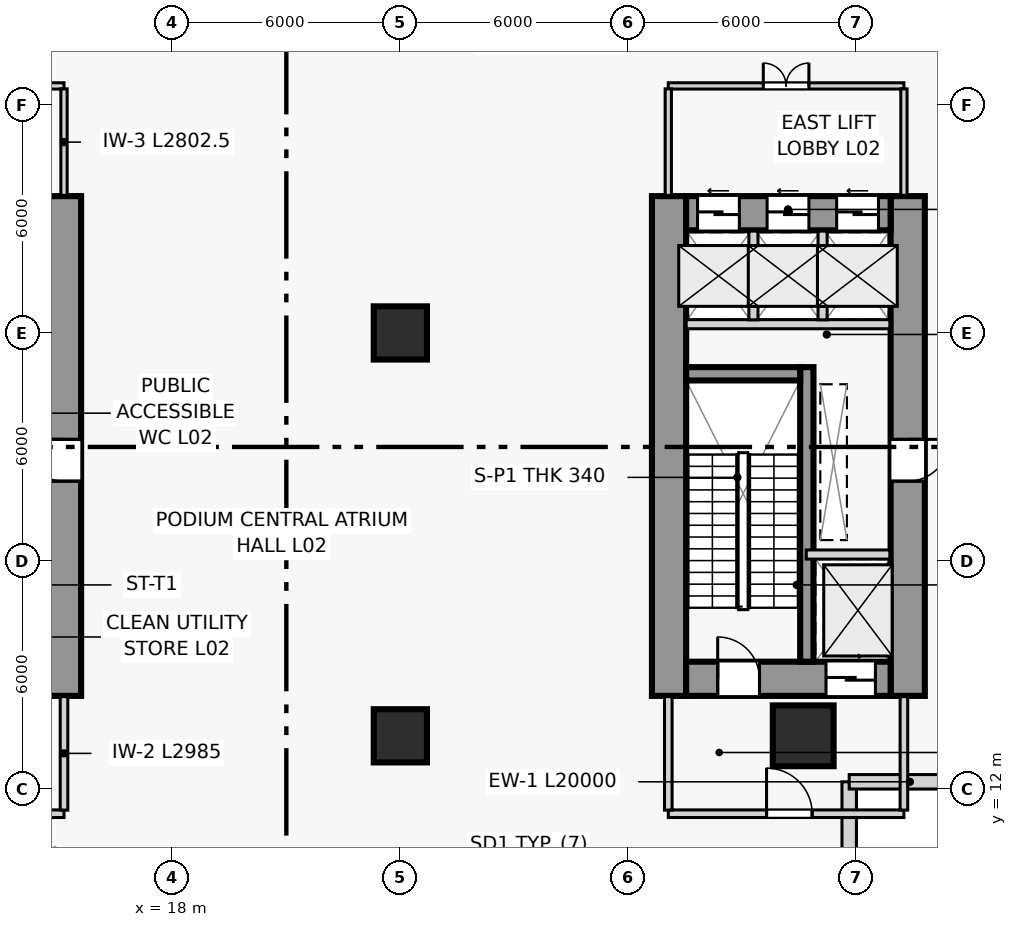
"""IFC4 building model, lengths in metres.
Left out: names, types, materials, properties, quantities, classifications, styles, units other than length and angle.
Written with IfcOpenShell. Run it as: python <this file> out.ifc"""

import sys

from ifc_helpers import new_model, si_unit, direction, frame, frame_2d, origin, origin_2d, place, context, subcontext, project, spatial, rectangle, extrude, source, transform, mapped, element, fill, save


model = new_model("IFC4")
c1 = context("Model", 3, precision=1e-05, world=origin(), true_north=direction((0.0, 1.0)))
c2 = subcontext(c1, "Body", "Model", "MODEL_VIEW")
j1 = project(units=[si_unit("LENGTHUNIT", "METRE"), si_unit("PLANEANGLEUNIT", "RADIAN")], contexts=[c1])
p1 = place(None, origin())
s1 = spatial("IfcSite", under=j1, at=p1, CompositionType="ELEMENT")
p2 = place(p1, origin())
s2 = spatial("IfcBuilding", under=s1, at=p2, CompositionType="ELEMENT")
p3 = place(p2, frame((0.0, 0.0, 9.0)))
s3 = spatial("IfcBuildingStorey", under=s2, at=p3, CompositionType="ELEMENT", Elevation=9.0)
p4 = place(p3, frame((15.15, 14.45, 0.0), z_axis=(0.0, 0.0, 1.0), x_axis=(0.0, 1.0, 0.0)))
e1 = element("IfcWall", 1, at=p4, inside=s3, PredefinedType="SHEAR", context=c2, shape_type="SweptSolid", body=[
    extrude(rectangle(XDim=13.15, YDim=0.9, at=frame_2d((6.575, 0.0))), origin(), (0.0, 0.0, 1.0), 4.5),
])
p5 = place(p4, frame((5.65, 0.0, 0.0)))
e2 = element("IfcOpeningElement", 2, at=p5, cuts=e1, PredefinedType="OPENING", context=c2, shape_type="SweptSolid", body=[
    extrude(rectangle(XDim=1.1, YDim=2.2, at=frame_2d((0.55, 1.1))), frame((0.0, 0.46, 0.0), z_axis=(0.0, -1.0, 0.0), x_axis=(1.0, 0.0, 0.0)), (0.0, 0.0, 1.0), 0.92),
])
p6 = place(p3, frame((31.07, 14.45, 0.0), z_axis=(0.0, 0.0, 1.0), x_axis=(0.0, 1.0, 0.0)))
e3 = element("IfcWall", 3, at=p6, inside=s3, PredefinedType="SHEAR", context=c2, shape_type="SweptSolid", body=[
    extrude(rectangle(XDim=13.15, YDim=0.9, at=frame_2d((6.575, 0.0))), origin(), (0.0, 0.0, 1.0), 4.5),
])
p7 = place(p3, frame((37.35, 14.45, 0.0), z_axis=(0.0, 0.0, 1.0), x_axis=(0.0, 1.0, 0.0)))
e4 = element("IfcWall", 4, at=p7, inside=s3, PredefinedType="SHEAR", context=c2, shape_type="SweptSolid", body=[
    extrude(rectangle(XDim=13.15, YDim=0.9, at=frame_2d((6.575, 0.0))), origin(), (0.0, 0.0, 1.0), 4.5),
])
p8 = place(p7, frame((5.65, 0.0, 0.0)))
e5 = element("IfcOpeningElement", 5, at=p8, cuts=e4, PredefinedType="OPENING", context=c2, shape_type="SweptSolid", body=[
    extrude(rectangle(XDim=1.1, YDim=2.2, at=frame_2d((0.55, 1.1))), frame((0.0, 0.46, 0.0), z_axis=(0.0, -1.0, 0.0), x_axis=(1.0, 0.0, 0.0)), (0.0, 0.0, 1.0), 0.92),
])
p9 = place(p3, frame((31.52, 14.9, 0.0), z_axis=(0.0, 0.0, 1.0), x_axis=(1.0, 0.0, 0.0)))
e6 = element("IfcWall", 6, at=p9, inside=s3, PredefinedType="SHEAR", context=c2, shape_type="SweptSolid", body=[
    extrude(rectangle(XDim=5.38, YDim=0.9, at=frame_2d((2.69, 0.0))), origin(), (0.0, 0.0, 1.0), 4.5),
])
p10 = place(p9, frame((0.83, 0.0, 0.0)))
e7 = element("IfcOpeningElement", 7, at=p10, cuts=e6, PredefinedType="OPENING", context=c2, shape_type="SweptSolid", body=[
    extrude(rectangle(XDim=1.1, YDim=2.2, at=frame_2d((0.55, 1.1))), frame((0.0, 0.46, 0.0), z_axis=(0.0, -1.0, 0.0), x_axis=(1.0, 0.0, 0.0)), (0.0, 0.0, 1.0), 0.92),
])
p11 = place(p9, frame((3.68, 0.0, 0.0)))
e8 = element("IfcOpeningElement", 8, at=p11, cuts=e6, PredefinedType="OPENING", context=c2, shape_type="SweptSolid", body=[
    extrude(rectangle(XDim=1.3, YDim=2.2, at=frame_2d((0.65, 1.1))), frame((0.0, 0.46, 0.0), z_axis=(0.0, -1.0, 0.0), x_axis=(1.0, 0.0, 0.0)), (0.0, 0.0, 1.0), 0.92),
])
p12 = place(p3, frame((31.52, 27.15, 0.0), z_axis=(0.0, 0.0, 1.0), x_axis=(1.0, 0.0, 0.0)))
e9 = element("IfcWall", 9, at=p12, inside=s3, PredefinedType="SHEAR", context=c2, shape_type="SweptSolid", body=[
    extrude(rectangle(XDim=5.38, YDim=0.9, at=frame_2d((2.69, 0.0))), origin(), (0.0, 0.0, 1.0), 4.5),
])
p13 = place(p12, frame((0.3, 0.0, 0.0)))
e10 = element("IfcOpeningElement", 10, at=p13, cuts=e9, PredefinedType="OPENING", context=c2, shape_type="SweptSolid", body=[
    extrude(rectangle(XDim=1.1, YDim=2.2, at=frame_2d((0.55, 1.1))), frame((0.0, 0.46, 0.0), z_axis=(0.0, -1.0, 0.0), x_axis=(1.0, 0.0, 0.0)), (0.0, 0.0, 1.0), 0.92),
])
p14 = place(p12, frame((2.13, 0.0, 0.0)))
e11 = element("IfcOpeningElement", 11, at=p14, cuts=e9, PredefinedType="OPENING", context=c2, shape_type="SweptSolid", body=[
    extrude(rectangle(XDim=1.1, YDim=2.2, at=frame_2d((0.55, 1.1))), frame((0.0, 0.46, 0.0), z_axis=(0.0, -1.0, 0.0), x_axis=(1.0, 0.0, 0.0)), (0.0, 0.0, 1.0), 0.92),
])
p15 = place(p12, frame((3.96, 0.0, 0.0)))
e12 = element("IfcOpeningElement", 12, at=p15, cuts=e9, PredefinedType="OPENING", context=c2, shape_type="SweptSolid", body=[
    extrude(rectangle(XDim=1.1, YDim=2.2, at=frame_2d((0.55, 1.1))), frame((0.0, 0.46, 0.0), z_axis=(0.0, -1.0, 0.0), x_axis=(1.0, 0.0, 0.0)), (0.0, 0.0, 1.0), 0.92),
])
p16 = place(p3, frame((34.695, 15.35, 0.0), z_axis=(0.0, 0.0, 1.0), x_axis=(0.0, 1.0, 0.0)))
e13 = element("IfcWall", 13, at=p16, inside=s3, PredefinedType="SHEAR", context=c2, shape_type="SweptSolid", body=[
    extrude(rectangle(XDim=7.75, YDim=0.35, at=frame_2d((3.875, 0.0))), origin(), (0.0, 0.0, 1.0), 4.5),
])
p17 = place(p3, frame((31.52, 22.925, 0.0), z_axis=(0.0, 0.0, 1.0), x_axis=(1.0, 0.0, 0.0)))
e14 = element("IfcWall", 14, at=p17, inside=s3, PredefinedType="SHEAR", context=c2, shape_type="SweptSolid", body=[
    extrude(rectangle(XDim=3.0, YDim=0.35, at=frame_2d((1.5, 0.0))), origin(), (0.0, 0.0, 1.0), 4.5),
])
m1 = source(origin(), c2, "Body", "SweptSolid", [
    extrude(rectangle(XDim=1.4, YDim=1.4, at=origin_2d()), origin(), (0.0, 0.0, 1.0), 4.5),
])
for number, where, z_axis, x_axis in (
    (15, (24.0, 13.4, 0.0), (0.0, 0.0, 1.0), (1.0, 0.0, 0.0)),
    (16, (24.0, 24.0, 0.0), (0.0, 0.0, 1.0), (1.0, 0.0, 0.0)),
):
    element("IfcColumn", number, at=place(p3, frame(where, z_axis=z_axis, x_axis=x_axis)), inside=s3, PredefinedType="COLUMN", context=c2, shape_type="MappedRepresentation", body=[
        mapped(m1, transform((0.0, 0.0, 0.0), scale=1.0)),
    ])
m2 = source(origin(), c2, "Body", "SweptSolid", [
    extrude(rectangle(XDim=1.6, YDim=1.6, at=origin_2d()), origin(), (0.0, 0.0, 1.0), 4.5),
])
p18 = place(p3, frame((34.6, 13.4, 0.0), z_axis=(0.0, 0.0, 1.0), x_axis=(1.0, 0.0, 0.0)))
e17 = element("IfcColumn", 17, at=p18, inside=s3, PredefinedType="COLUMN", context=c2, shape_type="MappedRepresentation", body=[
    mapped(m2, transform((0.0, 0.0, 0.0), scale=1.0)),
])
p19 = place(p3, frame((35.81, 7.69, 0.0), z_axis=(0.0, 0.0, 1.0), x_axis=(0.0, 1.0, 0.0)))
e18 = element("IfcWall", 18, at=p19, inside=s3, PredefinedType="SOLIDWALL", context=c2, shape_type="SweptSolid", body=[
    extrude(rectangle(XDim=4.5, YDim=0.38, at=frame_2d((2.25, 0.0))), origin(), (0.0, 0.0, 1.0), 4.16),
])
p20 = place(p19, frame((1.13, 0.0, 0.85)))
e19 = element("IfcOpeningElement", 19, at=p20, cuts=e18, PredefinedType="OPENING", context=c2, shape_type="SweptSolid", body=[
    extrude(rectangle(XDim=1.5, YDim=1.8, at=frame_2d((0.75, 0.9))), frame((0.0, 0.2, 0.0), z_axis=(0.0, -1.0, 0.0), x_axis=(1.0, 0.0, 0.0)), (0.0, 0.0, 1.0), 0.4),
])
p21 = place(p3, frame((35.81, 12.19, 0.0), z_axis=(0.0, 0.0, 1.0), x_axis=(1.0, 0.0, 0.0)))
e20 = element("IfcWall", 20, at=p21, inside=s3, PredefinedType="SOLIDWALL", context=c2, shape_type="SweptSolid", body=[
    extrude(rectangle(XDim=20.0, YDim=0.38, at=frame_2d((10.0, 0.0))), origin(), (0.0, 0.0, 1.0), 4.16),
])
p22 = place(p21, frame((3.192, 0.0, 0.85)))
e21 = element("IfcOpeningElement", 21, at=p22, cuts=e20, PredefinedType="OPENING", context=c2, shape_type="SweptSolid", body=[
    extrude(rectangle(XDim=1.5, YDim=1.8, at=frame_2d((0.75, 0.9))), frame((0.0, 0.2, 0.0), z_axis=(0.0, -1.0, 0.0), x_axis=(1.0, 0.0, 0.0)), (0.0, 0.0, 1.0), 0.4),
])
p23 = place(p21, frame((7.677, 0.0, 0.85)))
e22 = element("IfcOpeningElement", 22, at=p23, cuts=e20, PredefinedType="OPENING", context=c2, shape_type="SweptSolid", body=[
    extrude(rectangle(XDim=1.5, YDim=1.8, at=frame_2d((0.75, 0.9))), frame((0.0, 0.2, 0.0), z_axis=(0.0, -1.0, 0.0), x_axis=(1.0, 0.0, 0.0)), (0.0, 0.0, 1.0), 0.4),
])
p24 = place(p21, frame((12.163, 0.0, 0.85)))
e23 = element("IfcOpeningElement", 23, at=p24, cuts=e20, PredefinedType="OPENING", context=c2, shape_type="SweptSolid", body=[
    extrude(rectangle(XDim=1.5, YDim=1.8, at=frame_2d((0.75, 0.9))), frame((0.0, 0.2, 0.0), z_axis=(0.0, -1.0, 0.0), x_axis=(1.0, 0.0, 0.0)), (0.0, 0.0, 1.0), 0.4),
])
p25 = place(p21, frame((16.647, 0.0, 0.85)))
e24 = element("IfcOpeningElement", 24, at=p25, cuts=e20, PredefinedType="OPENING", context=c2, shape_type="SweptSolid", body=[
    extrude(rectangle(XDim=1.5, YDim=1.8, at=frame_2d((0.75, 0.9))), frame((0.0, 0.2, 0.0), z_axis=(0.0, -1.0, 0.0), x_axis=(1.0, 0.0, 0.0)), (0.0, 0.0, 1.0), 0.4),
])
p26 = place(p3, frame((34.68, 18.17, 0.0), z_axis=(0.0, 0.0, 1.0), x_axis=(1.0, 0.0, 0.0)))
e25 = element("IfcWall", 25, at=p26, inside=s3, PredefinedType="PARTITIONING", context=c2, shape_type="SweptSolid", body=[
    extrude(rectangle(XDim=2.2, YDim=0.24, at=frame_2d((1.1, 0.0))), origin(), (0.0, 0.0, 1.0), 4.16),
])
p27 = place(p3, frame((8.05, 11.35, 0.0), z_axis=(0.0, 0.0, 1.0), x_axis=(1.0, 0.0, 0.0)))
e26 = element("IfcWall", 26, at=p27, inside=s3, PredefinedType="PARTITIONING", context=c2, shape_type="SweptSolid", body=[
    extrude(rectangle(XDim=7.1, YDim=0.2, at=frame_2d((3.55, 0.0))), origin(), (0.0, 0.0, 1.0), 4.16),
])
p28 = place(p27, frame((2.846, 0.0, 0.0)))
e27 = element("IfcOpeningElement", 27, at=p28, cuts=e26, PredefinedType="OPENING", context=c2, shape_type="SweptSolid", body=[
    extrude(rectangle(XDim=1.2, YDim=2.2, at=frame_2d((0.6, 1.1))), frame((0.0, 0.11, 0.0), z_axis=(0.0, -1.0, 0.0), x_axis=(1.0, 0.0, 0.0)), (0.0, 0.0, 1.0), 0.22),
])
p29 = place(p3, frame((15.15, 11.445, 0.0), z_axis=(0.0, 0.0, 1.0), x_axis=(0.0, 1.0, 0.0)))
e28 = element("IfcWall", 28, at=p29, inside=s3, PredefinedType="PARTITIONING", context=c2, shape_type="SweptSolid", body=[
    extrude(rectangle(XDim=2.985, YDim=0.2, at=frame_2d((1.492, 0.0))), origin(), (0.0, 0.0, 1.0), 4.16),
])
p30 = place(p3, frame((31.05, 11.35, 0.0), z_axis=(0.0, 0.0, 1.0), x_axis=(1.0, 0.0, 0.0)))
e29 = element("IfcWall", 29, at=p30, inside=s3, PredefinedType="PARTITIONING", context=c2, shape_type="SweptSolid", body=[
    extrude(rectangle(XDim=6.2, YDim=0.2, at=frame_2d((3.1, 0.0))), origin(), (0.0, 0.0, 1.0), 4.16),
])
p31 = place(p30, frame((2.586, 0.0, 0.0)))
e30 = element("IfcOpeningElement", 30, at=p31, cuts=e29, PredefinedType="OPENING", context=c2, shape_type="SweptSolid", body=[
    extrude(rectangle(XDim=1.2, YDim=2.2, at=frame_2d((0.6, 1.1))), frame((0.0, 0.11, 0.0), z_axis=(0.0, -1.0, 0.0), x_axis=(1.0, 0.0, 0.0)), (0.0, 0.0, 1.0), 0.22),
])
for number, where, z_axis, x_axis in (
    (31, (31.05, 11.445, 0.0), (0.0, 0.0, 1.0), (0.0, 1.0, 0.0)),
    (32, (37.25, 11.445, 0.0), (0.0, 0.0, 1.0), (0.0, 1.0, 0.0)),
):
    element("IfcWall", number, at=place(p3, frame(where, z_axis=z_axis, x_axis=x_axis)), inside=s3, PredefinedType="PARTITIONING", context=c2, shape_type="SweptSolid", body=[
        extrude(rectangle(XDim=2.985, YDim=0.2, at=frame_2d((1.492, 0.0))), origin(), (0.0, 0.0, 1.0), 4.16),
    ])
p32 = place(p3, frame((31.52, 24.23, 0.0), z_axis=(0.0, 0.0, 1.0), x_axis=(1.0, 0.0, 0.0)))
e33 = element("IfcWall", 33, at=p32, inside=s3, PredefinedType="PARTITIONING", context=c2, shape_type="SweptSolid", body=[
    extrude(rectangle(XDim=5.36, YDim=0.24, at=frame_2d((2.68, 0.0))), origin(), (0.0, 0.0, 1.0), 4.16),
])
for number, where, z_axis, x_axis in (
    (34, (33.29, 24.345, 0.0), (0.0, 0.0, 1.0), (0.0, 1.0, 0.0)),
    (35, (35.11, 24.345, 0.0), (0.0, 0.0, 1.0), (0.0, 1.0, 0.0)),
):
    element("IfcWall", number, at=place(p3, frame(where, z_axis=z_axis, x_axis=x_axis)), inside=s3, PredefinedType="PARTITIONING", context=c2, shape_type="SweptSolid", body=[
        extrude(rectangle(XDim=2.335, YDim=0.24, at=frame_2d((1.167, 0.0))), origin(), (0.0, 0.0, 1.0), 4.16),
    ])
p33 = place(p3, frame((8.05, 30.5, 0.0), z_axis=(0.0, 0.0, 1.0), x_axis=(1.0, 0.0, 0.0)))
e36 = element("IfcWall", 36, at=p33, inside=s3, PredefinedType="PARTITIONING", context=c2, shape_type="SweptSolid", body=[
    extrude(rectangle(XDim=7.1, YDim=0.165, at=frame_2d((3.55, 0.0))), origin(), (0.0, 0.0, 1.0), 4.16),
])
p34 = place(p33, frame((2.95, 0.0, 0.0)))
e37 = element("IfcOpeningElement", 37, at=p34, cuts=e36, PredefinedType="OPENING", context=c2, shape_type="SweptSolid", body=[
    extrude(rectangle(XDim=1.2, YDim=2.2, at=frame_2d((0.6, 1.1))), frame((0.0, 0.093, 0.0), z_axis=(0.0, -1.0, 0.0), x_axis=(1.0, 0.0, 0.0)), (0.0, 0.0, 1.0), 0.185),
])
p35 = place(p3, frame((15.15, 27.62, 0.0), z_axis=(0.0, 0.0, 1.0), x_axis=(0.0, 1.0, 0.0)))
e38 = element("IfcWall", 38, at=p35, inside=s3, PredefinedType="PARTITIONING", context=c2, shape_type="SweptSolid", body=[
    extrude(rectangle(XDim=2.802, YDim=0.165, at=frame_2d((1.401, 0.0))), origin(), (0.0, 0.0, 1.0), 4.16),
])
p36 = place(p3, frame((31.05, 30.5, 0.0), z_axis=(0.0, 0.0, 1.0), x_axis=(1.0, 0.0, 0.0)))
e39 = element("IfcWall", 39, at=p36, inside=s3, PredefinedType="PARTITIONING", context=c2, shape_type="SweptSolid", body=[
    extrude(rectangle(XDim=6.2, YDim=0.165, at=frame_2d((3.1, 0.0))), origin(), (0.0, 0.0, 1.0), 4.16),
])
p37 = place(p36, frame((2.5, 0.0, 0.0)))
e40 = element("IfcOpeningElement", 40, at=p37, cuts=e39, PredefinedType="OPENING", context=c2, shape_type="SweptSolid", body=[
    extrude(rectangle(XDim=1.2, YDim=2.2, at=frame_2d((0.6, 1.1))), frame((0.0, 0.093, 0.0), z_axis=(0.0, -1.0, 0.0), x_axis=(1.0, 0.0, 0.0)), (0.0, 0.0, 1.0), 0.185),
])
for number, where, z_axis, x_axis in (
    (41, (31.05, 27.62, 0.0), (0.0, 0.0, 1.0), (0.0, 1.0, 0.0)),
    (42, (37.25, 27.62, 0.0), (0.0, 0.0, 1.0), (0.0, 1.0, 0.0)),
):
    element("IfcWall", number, at=place(p3, frame(where, z_axis=z_axis, x_axis=x_axis)), inside=s3, PredefinedType="PARTITIONING", context=c2, shape_type="SweptSolid", body=[
        extrude(rectangle(XDim=2.802, YDim=0.165, at=frame_2d((1.401, 0.0))), origin(), (0.0, 0.0, 1.0), 4.16),
    ])
m3 = source(origin(), c2, "Body", "SweptSolid", [
    extrude(rectangle(XDim=1.1, YDim=2.2, at=frame_2d((0.55, 1.1))), frame((0.0, 0.025, 0.0), z_axis=(0.0, -1.0, 0.0), x_axis=(1.0, 0.0, 0.0)), (0.0, 0.0, 1.0), 0.05),
])
p38 = place(p10, origin())
e43 = element("IfcDoor", 43, at=p38, inside=s3, OperationType="SINGLE_SWING_LEFT", PredefinedType="DOOR", context=c2, shape_type="MappedRepresentation", body=[
    mapped(m3, transform((0.0, 0.0, 0.0), scale=1.0)),
])
fill(e7, e43)
m4 = source(origin(), c2, "Body", "SweptSolid", [
    extrude(rectangle(XDim=1.3, YDim=2.2, at=frame_2d((0.65, 1.1))), frame((0.0, 0.025, 0.0), z_axis=(0.0, -1.0, 0.0), x_axis=(1.0, 0.0, 0.0)), (0.0, 0.0, 1.0), 0.05),
])
p39 = place(p11, origin())
e44 = element("IfcDoor", 44, at=p39, inside=s3, OperationType="SLIDING_TO_RIGHT", PredefinedType="DOOR", context=c2, shape_type="MappedRepresentation", body=[
    mapped(m4, transform((0.0, 0.0, 0.0), scale=1.0)),
])
fill(e8, e44)
m5 = source(origin(), c2, "Body", "SweptSolid", [
    extrude(rectangle(XDim=1.2, YDim=2.2, at=frame_2d((0.6, 1.1))), frame((0.0, 0.025, 0.0), z_axis=(0.0, -1.0, 0.0), x_axis=(1.0, 0.0, 0.0)), (0.0, 0.0, 1.0), 0.05),
])
p40 = place(p31, origin())
e45 = element("IfcDoor", 45, at=p40, inside=s3, OperationType="SINGLE_SWING_LEFT", PredefinedType="DOOR", context=c2, shape_type="MappedRepresentation", body=[
    mapped(m5, transform((0.0, 0.0, 0.0), scale=1.0)),
])
fill(e30, e45)
m6 = source(origin(), c2, "Body", "SweptSolid", [
    extrude(rectangle(XDim=1.1, YDim=2.2, at=frame_2d((0.55, 1.1))), frame((0.0, 0.025, 0.0), z_axis=(0.0, -1.0, 0.0), x_axis=(1.0, 0.0, 0.0)), (0.0, 0.0, 1.0), 0.05),
])
p41 = place(p13, origin())
e46 = element("IfcDoor", 46, at=p41, inside=s3, OperationType="SLIDING_TO_LEFT", PredefinedType="DOOR", context=c2, shape_type="MappedRepresentation", body=[
    mapped(m6, transform((0.0, 0.0, 0.0), scale=1.0)),
])
fill(e10, e46)
p42 = place(p14, origin())
e47 = element("IfcDoor", 47, at=p42, inside=s3, OperationType="SLIDING_TO_LEFT", PredefinedType="DOOR", context=c2, shape_type="MappedRepresentation", body=[
    mapped(m6, transform((0.0, 0.0, 0.0), scale=1.0)),
])
fill(e11, e47)
p43 = place(p15, origin())
e48 = element("IfcDoor", 48, at=p43, inside=s3, OperationType="SLIDING_TO_LEFT", PredefinedType="DOOR", context=c2, shape_type="MappedRepresentation", body=[
    mapped(m6, transform((0.0, 0.0, 0.0), scale=1.0)),
])
fill(e12, e48)
p44 = place(p37, origin())
e49 = element("IfcDoor", 49, at=p44, inside=s3, OperationType="DOUBLE_DOOR_SINGLE_SWING", PredefinedType="DOOR", context=c2, shape_type="MappedRepresentation", body=[
    mapped(m5, transform((0.0, 0.0, 0.0), scale=1.0)),
])
fill(e40, e49)
p45 = place(p5, origin())
e50 = element("IfcDoor", 50, at=p45, inside=s3, OperationType="SINGLE_SWING_RIGHT", PredefinedType="DOOR", context=c2, shape_type="MappedRepresentation", body=[
    mapped(m3, transform((0.0, 0.0, 0.0), scale=1.0)),
])
fill(e2, e50)
p46 = place(p8, frame((1.1, 0.0, 0.0), z_axis=(0.0, 0.0, 1.0), x_axis=(-1.0, 0.0, 0.0)))
e51 = element("IfcDoor", 51, at=p46, inside=s3, OperationType="SINGLE_SWING_LEFT", PredefinedType="DOOR", context=c2, shape_type="MappedRepresentation", body=[
    mapped(m3, transform((0.0, 0.0, 0.0), scale=1.0)),
])
fill(e5, e51)
save(model, sys.argv[1])
